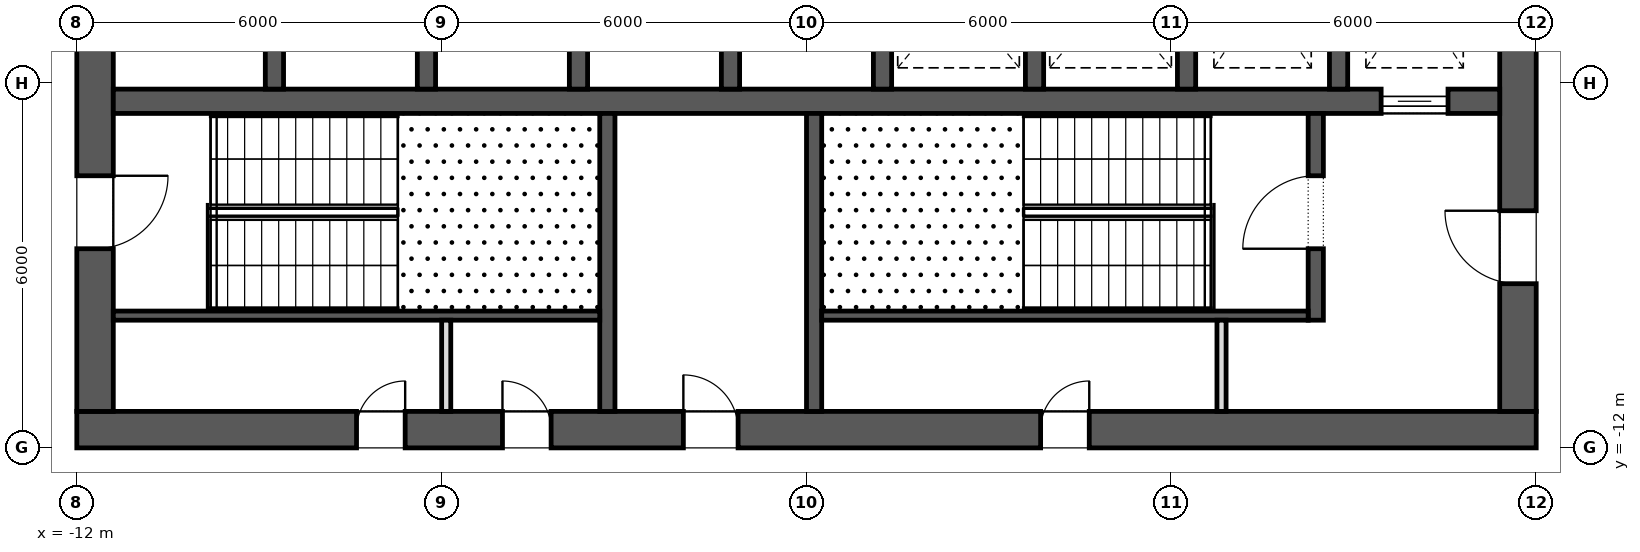
"""IFC4 building model, lengths in metres.
Left out: names, types, materials, properties, quantities, classifications, styles, units other than length and angle.
Written with IfcOpenShell. Run it as: python <this file> out.ifc"""

import sys

from ifc_helpers import new_model, si_unit, direction, frame, frame_2d, origin, place, context, subcontext, project, spatial, rectangle, extrude, element, fill, save


model = new_model("IFC4")
c1 = context("Model", 3, precision=1e-05, world=origin(), true_north=direction((0.0, 1.0)))
c2 = subcontext(c1, "Body", "Model", "MODEL_VIEW")
j1 = project(units=[si_unit("LENGTHUNIT", "METRE"), si_unit("PLANEANGLEUNIT", "RADIAN")], contexts=[c1])
p1 = place(None, origin())
s1 = spatial("IfcSite", under=j1, at=p1, CompositionType="ELEMENT")
p2 = place(p1, origin())
s2 = spatial("IfcBuilding", under=s1, at=p2, CompositionType="ELEMENT")
p3 = place(p2, frame((0.0, 0.0, 163.3)))
s3 = spatial("IfcBuildingStorey", under=s2, at=p3, CompositionType="ELEMENT", Elevation=163.3)
p4 = place(p3, frame((-12.0, -11.7, 0.0), z_axis=(0.0, 0.0, 1.0), x_axis=(1.0, 0.0, 0.0)))
e1 = element("IfcWall", 1, at=p4, inside=s3, PredefinedType="SHEAR", context=c2, shape_type="SweptSolid", body=[
    extrude(rectangle(XDim=24.0, YDim=0.6, at=frame_2d((12.0, 0.0))), origin(), (0.0, 0.0, 1.0), 4.2),
])
p5 = place(p4, frame((9.975, 0.0, 0.0)))
e2 = element("IfcOpeningElement", 2, at=p5, cuts=e1, PredefinedType="OPENING", context=c2, shape_type="SweptSolid", body=[
    extrude(rectangle(XDim=0.9, YDim=2.1, at=frame_2d((0.45, 1.05))), frame((0.0, 0.312, 0.0), z_axis=(0.0, -1.0, 0.0), x_axis=(1.0, 0.0, 0.0)), (0.0, 0.0, 1.0), 0.624),
])
p6 = place(p4, frame((4.6, 0.0, 0.0)))
e3 = element("IfcOpeningElement", 3, at=p6, cuts=e1, PredefinedType="OPENING", context=c2, shape_type="SweptSolid", body=[
    extrude(rectangle(XDim=0.8, YDim=2.1, at=frame_2d((0.4, 1.05))), frame((0.0, 0.312, 0.0), z_axis=(0.0, -1.0, 0.0), x_axis=(1.0, 0.0, 0.0)), (0.0, 0.0, 1.0), 0.624),
])
p7 = place(p4, frame((7.0, 0.0, 0.0)))
e4 = element("IfcOpeningElement", 4, at=p7, cuts=e1, PredefinedType="OPENING", context=c2, shape_type="SweptSolid", body=[
    extrude(rectangle(XDim=0.8, YDim=2.1, at=frame_2d((0.4, 1.05))), frame((0.0, 0.312, 0.0), z_axis=(0.0, -1.0, 0.0), x_axis=(1.0, 0.0, 0.0)), (0.0, 0.0, 1.0), 0.624),
])
p8 = place(p4, frame((15.85, 0.0, 0.0)))
e5 = element("IfcOpeningElement", 5, at=p8, cuts=e1, PredefinedType="OPENING", context=c2, shape_type="SweptSolid", body=[
    extrude(rectangle(XDim=0.8, YDim=2.1, at=frame_2d((0.4, 1.05))), frame((0.0, 0.312, 0.0), z_axis=(0.0, -1.0, 0.0), x_axis=(1.0, 0.0, 0.0)), (0.0, 0.0, 1.0), 0.624),
])
p9 = place(p3, frame((11.7, -11.4, 0.0), z_axis=(0.0, 0.0, 1.0), x_axis=(0.0, 1.0, 0.0)))
e6 = element("IfcWall", 6, at=p9, inside=s3, PredefinedType="SHEAR", context=c2, shape_type="SweptSolid", body=[
    extrude(rectangle(XDim=22.8, YDim=0.6, at=frame_2d((11.4, 0.0))), origin(), (0.0, 0.0, 1.0), 4.2),
])
p10 = place(p9, frame((10.2, 0.0, 0.0)))
e7 = element("IfcOpeningElement", 7, at=p10, cuts=e6, PredefinedType="OPENING", context=c2, shape_type="SweptSolid", body=[
    extrude(rectangle(XDim=2.4, YDim=2.1, at=frame_2d((1.2, 1.05))), frame((0.0, 0.312, 0.0), z_axis=(0.0, -1.0, 0.0), x_axis=(1.0, 0.0, 0.0)), (0.0, 0.0, 1.0), 0.624),
])
p11 = place(p9, frame((19.5, 0.0, 0.0)))
e8 = element("IfcOpeningElement", 8, at=p11, cuts=e6, PredefinedType="OPENING", context=c2, shape_type="SweptSolid", body=[
    extrude(rectangle(XDim=1.2, YDim=2.1, at=frame_2d((0.6, 1.05))), frame((0.0, 0.312, 0.0), z_axis=(0.0, -1.0, 0.0), x_axis=(1.0, 0.0, 0.0)), (0.0, 0.0, 1.0), 0.624),
])
p12 = place(p9, frame((2.1, 0.0, 0.0)))
e9 = element("IfcOpeningElement", 9, at=p12, cuts=e6, PredefinedType="OPENING", context=c2, shape_type="SweptSolid", body=[
    extrude(rectangle(XDim=1.2, YDim=2.1, at=frame_2d((0.6, 1.05))), frame((0.0, 0.312, 0.0), z_axis=(0.0, -1.0, 0.0), x_axis=(1.0, 0.0, 0.0)), (0.0, 0.0, 1.0), 0.624),
])
p13 = place(p3, frame((-11.7, -11.4, 0.0), z_axis=(0.0, 0.0, 1.0), x_axis=(0.0, 1.0, 0.0)))
e10 = element("IfcWall", 10, at=p13, inside=s3, PredefinedType="SHEAR", context=c2, shape_type="SweptSolid", body=[
    extrude(rectangle(XDim=22.8, YDim=0.6, at=frame_2d((11.4, 0.0))), origin(), (0.0, 0.0, 1.0), 4.2),
])
p14 = place(p13, frame((10.2, 0.0, 0.0)))
e11 = element("IfcOpeningElement", 11, at=p14, cuts=e10, PredefinedType="OPENING", context=c2, shape_type="SweptSolid", body=[
    extrude(rectangle(XDim=2.4, YDim=2.1, at=frame_2d((1.2, 1.05))), frame((0.0, 0.312, 0.0), z_axis=(0.0, -1.0, 0.0), x_axis=(1.0, 0.0, 0.0)), (0.0, 0.0, 1.0), 0.624),
])
p15 = place(p13, frame((18.925, 0.0, 0.0)))
e12 = element("IfcOpeningElement", 12, at=p15, cuts=e10, PredefinedType="OPENING", context=c2, shape_type="SweptSolid", body=[
    extrude(rectangle(XDim=1.2, YDim=2.1, at=frame_2d((0.6, 1.05))), frame((0.0, 0.312, 0.0), z_axis=(0.0, -1.0, 0.0), x_axis=(1.0, 0.0, 0.0)), (0.0, 0.0, 1.0), 0.624),
])
p16 = place(p13, frame((2.675, 0.0, 0.0)))
e13 = element("IfcOpeningElement", 13, at=p16, cuts=e10, PredefinedType="OPENING", context=c2, shape_type="SweptSolid", body=[
    extrude(rectangle(XDim=1.2, YDim=2.1, at=frame_2d((0.6, 1.05))), frame((0.0, 0.312, 0.0), z_axis=(0.0, -1.0, 0.0), x_axis=(1.0, 0.0, 0.0)), (0.0, 0.0, 1.0), 0.624),
])
p17 = place(p3, frame((-11.4, -6.3, 0.0), z_axis=(0.0, 0.0, 1.0), x_axis=(1.0, 0.0, 0.0)))
e14 = element("IfcWall", 14, at=p17, inside=s3, PredefinedType="SHEAR", context=c2, shape_type="SweptSolid", body=[
    extrude(rectangle(XDim=22.8, YDim=0.4, at=frame_2d((11.4, 0.0))), origin(), (0.0, 0.0, 1.0), 4.2),
])
p18 = place(p17, frame((20.85, 0.0, 0.0)))
e15 = element("IfcOpeningElement", 15, at=p18, cuts=e14, PredefinedType="OPENING", context=c2, shape_type="SweptSolid", body=[
    extrude(rectangle(XDim=1.1, YDim=2.1, at=frame_2d((0.55, 1.05))), frame((0.0, 0.212, 0.0), z_axis=(0.0, -1.0, 0.0), x_axis=(1.0, 0.0, 0.0)), (0.0, 0.0, 1.0), 0.424),
])
for number, where, z_axis, x_axis in (
    (16, (-8.75, -6.1, 0.0), (0.0, 0.0, 1.0), (0.0, 1.0, 0.0)),
    (17, (-6.25, -6.1, 0.0), (0.0, 0.0, 1.0), (0.0, 1.0, 0.0)),
    (18, (-3.75, -6.1, 0.0), (0.0, 0.0, 1.0), (0.0, 1.0, 0.0)),
    (19, (-1.25, -6.1, 0.0), (0.0, 0.0, 1.0), (0.0, 1.0, 0.0)),
    (20, (1.25, -6.1, 0.0), (0.0, 0.0, 1.0), (0.0, 1.0, 0.0)),
    (21, (3.75, -6.1, 0.0), (0.0, 0.0, 1.0), (0.0, 1.0, 0.0)),
    (22, (6.25, -6.1, 0.0), (0.0, 0.0, 1.0), (0.0, 1.0, 0.0)),
    (23, (8.75, -6.1, 0.0), (0.0, 0.0, 1.0), (0.0, 1.0, 0.0)),
):
    element("IfcWall", number, at=place(p3, frame(where, z_axis=z_axis, x_axis=x_axis)), inside=s3, PredefinedType="SHEAR", context=c2, shape_type="SweptSolid", body=[
        extrude(rectangle(XDim=2.9, YDim=0.3, at=frame_2d((1.45, 0.0))), origin(), (0.0, 0.0, 1.0), 4.2),
    ])
for number, where, z_axis, x_axis in (
    (24, (-3.275, -11.4, 0.0), (0.0, 0.0, 1.0), (0.0, 1.0, 0.0)),
    (25, (0.125, -11.4, 0.0), (0.0, 0.0, 1.0), (0.0, 1.0, 0.0)),
):
    element("IfcWall", number, at=place(p3, frame(where, z_axis=z_axis, x_axis=x_axis)), inside=s3, PredefinedType="SHEAR", context=c2, shape_type="SweptSolid", body=[
        extrude(rectangle(XDim=4.9, YDim=0.25, at=frame_2d((2.45, 0.0))), origin(), (0.0, 0.0, 1.0), 3.85),
    ])
p19 = place(p3, frame((8.375, -9.9, 0.0), z_axis=(0.0, 0.0, 1.0), x_axis=(0.0, 1.0, 0.0)))
e26 = element("IfcWall", 26, at=p19, inside=s3, PredefinedType="SHEAR", context=c2, shape_type="SweptSolid", body=[
    extrude(rectangle(XDim=3.4, YDim=0.25, at=frame_2d((1.7, 0.0))), origin(), (0.0, 0.0, 1.0), 3.85),
])
p20 = place(p19, frame((1.175, 0.0, 0.0)))
e27 = element("IfcOpeningElement", 27, at=p20, cuts=e26, PredefinedType="OPENING", context=c2, shape_type="SweptSolid", body=[
    extrude(rectangle(XDim=1.2, YDim=2.1, at=frame_2d((0.6, 1.05))), frame((0.0, 0.137, 0.0), z_axis=(0.0, -1.0, 0.0), x_axis=(1.0, 0.0, 0.0)), (0.0, 0.0, 1.0), 0.274),
])
for number, where, z_axis, x_axis in (
    (28, (-11.4, -9.825, 0.0), (0.0, 0.0, 1.0), (1.0, 0.0, 0.0)),
    (29, (0.25, -9.825, 0.0), (0.0, 0.0, 1.0), (1.0, 0.0, 0.0)),
):
    element("IfcWall", number, at=place(p3, frame(where, z_axis=z_axis, x_axis=x_axis)), inside=s3, PredefinedType="SHEAR", context=c2, shape_type="SweptSolid", body=[
        extrude(rectangle(XDim=8.0, YDim=0.15, at=frame_2d((4.0, 0.0))), origin(), (0.0, 0.0, 1.0), 3.85),
    ])
for number, where, z_axis, x_axis in (
    (30, (-5.925, -11.4, 0.0), (0.0, 0.0, 1.0), (0.0, 1.0, 0.0)),
    (31, (6.825, -11.4, 0.0), (0.0, 0.0, 1.0), (0.0, 1.0, 0.0)),
):
    element("IfcWall", number, at=place(p3, frame(where, z_axis=z_axis, x_axis=x_axis)), inside=s3, PredefinedType="PARTITIONING", context=c2, shape_type="SweptSolid", body=[
        extrude(rectangle(XDim=1.5, YDim=0.15, at=frame_2d((0.75, 0.0))), origin(), (0.0, 0.0, 1.0), 3.85),
    ])
p21 = place(p18, origin())
e32 = element("IfcDoor", 32, at=p21, inside=s3, OperationType="SLIDING_TO_LEFT", PredefinedType="DOOR", context=c2, shape_type="SweptSolid", body=[
    extrude(rectangle(XDim=1.1, YDim=2.1, at=frame_2d((0.55, 1.05))), frame((0.0, 0.025, 0.0), z_axis=(0.0, -1.0, 0.0), x_axis=(1.0, 0.0, 0.0)), (0.0, 0.0, 1.0), 0.05),
])
fill(e15, e32)
p22 = place(p16, frame((1.2, 0.0, 0.0), z_axis=(0.0, 0.0, 1.0), x_axis=(-1.0, 0.0, 0.0)))
e33 = element("IfcDoor", 33, at=p22, inside=s3, OperationType="SINGLE_SWING_RIGHT", PredefinedType="DOOR", context=c2, shape_type="SweptSolid", body=[
    extrude(rectangle(XDim=1.2, YDim=2.1, at=frame_2d((0.6, 1.05))), frame((0.0, 0.025, 0.0), z_axis=(0.0, -1.0, 0.0), x_axis=(1.0, 0.0, 0.0)), (0.0, 0.0, 1.0), 0.05),
])
fill(e13, e33)
p23 = place(p20, origin())
e34 = element("IfcDoor", 34, at=p23, inside=s3, OperationType="SINGLE_SWING_RIGHT", PredefinedType="DOOR", context=c2, shape_type="SweptSolid", body=[
    extrude(rectangle(XDim=1.2, YDim=2.1, at=frame_2d((0.6, 1.05))), frame((0.0, 0.025, 0.0), z_axis=(0.0, -1.0, 0.0), x_axis=(1.0, 0.0, 0.0)), (0.0, 0.0, 1.0), 0.05),
])
fill(e27, e34)
p24 = place(p12, origin())
e35 = element("IfcDoor", 35, at=p24, inside=s3, OperationType="SINGLE_SWING_LEFT", PredefinedType="DOOR", context=c2, shape_type="SweptSolid", body=[
    extrude(rectangle(XDim=1.2, YDim=2.1, at=frame_2d((0.6, 1.05))), frame((0.0, 0.025, 0.0), z_axis=(0.0, -1.0, 0.0), x_axis=(1.0, 0.0, 0.0)), (0.0, 0.0, 1.0), 0.05),
])
fill(e9, e35)
p25 = place(p5, origin())
e36 = element("IfcDoor", 36, at=p25, inside=s3, OperationType="SINGLE_SWING_RIGHT", PredefinedType="DOOR", context=c2, shape_type="SweptSolid", body=[
    extrude(rectangle(XDim=0.9, YDim=2.1, at=frame_2d((0.45, 1.05))), frame((0.0, 0.025, 0.0), z_axis=(0.0, -1.0, 0.0), x_axis=(1.0, 0.0, 0.0)), (0.0, 0.0, 1.0), 0.05),
])
fill(e2, e36)
p26 = place(p6, origin())
e37 = element("IfcDoor", 37, at=p26, inside=s3, OperationType="SINGLE_SWING_LEFT", PredefinedType="DOOR", context=c2, shape_type="SweptSolid", body=[
    extrude(rectangle(XDim=0.8, YDim=2.1, at=frame_2d((0.4, 1.05))), frame((0.0, 0.025, 0.0), z_axis=(0.0, -1.0, 0.0), x_axis=(1.0, 0.0, 0.0)), (0.0, 0.0, 1.0), 0.05),
])
fill(e3, e37)
p27 = place(p7, origin())
e38 = element("IfcDoor", 38, at=p27, inside=s3, OperationType="SINGLE_SWING_RIGHT", PredefinedType="DOOR", context=c2, shape_type="SweptSolid", body=[
    extrude(rectangle(XDim=0.8, YDim=2.1, at=frame_2d((0.4, 1.05))), frame((0.0, 0.025, 0.0), z_axis=(0.0, -1.0, 0.0), x_axis=(1.0, 0.0, 0.0)), (0.0, 0.0, 1.0), 0.05),
])
fill(e4, e38)
p28 = place(p8, origin())
e39 = element("IfcDoor", 39, at=p28, inside=s3, OperationType="SINGLE_SWING_LEFT", PredefinedType="DOOR", context=c2, shape_type="SweptSolid", body=[
    extrude(rectangle(XDim=0.8, YDim=2.1, at=frame_2d((0.4, 1.05))), frame((0.0, 0.025, 0.0), z_axis=(0.0, -1.0, 0.0), x_axis=(1.0, 0.0, 0.0)), (0.0, 0.0, 1.0), 0.05),
])
fill(e5, e39)
save(model, sys.argv[1])
